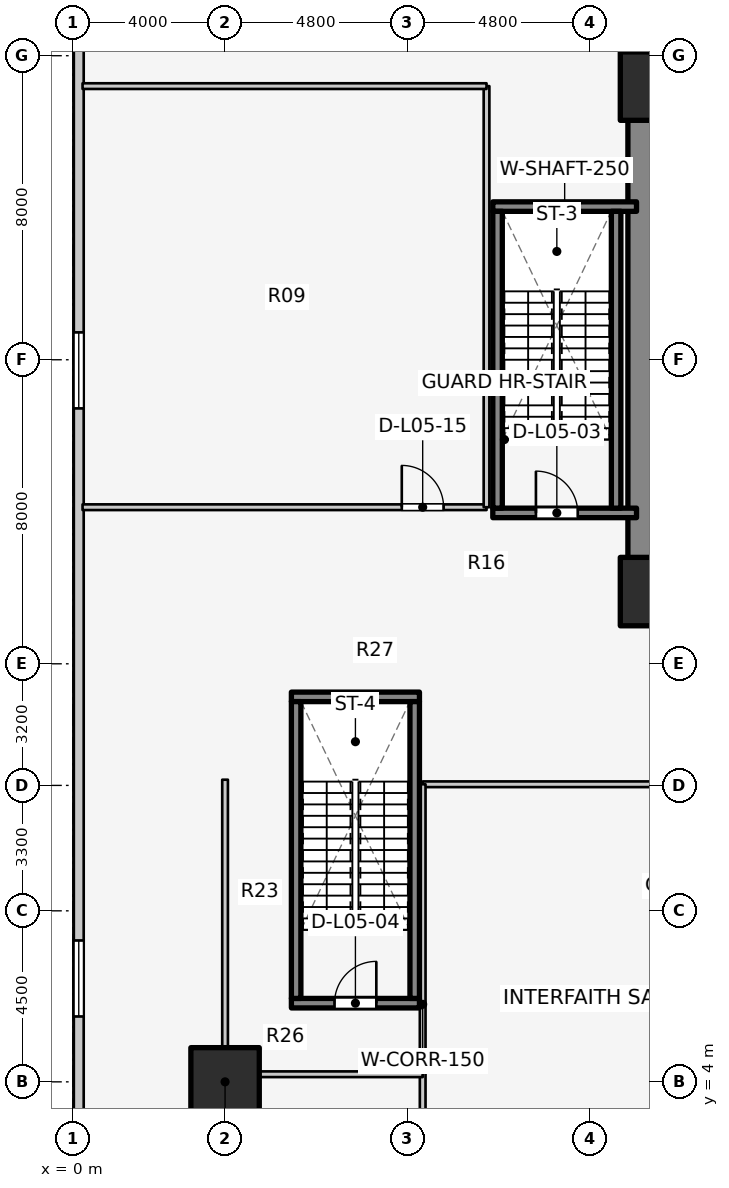
"""IFC4 building model, lengths in metres.
Left out: names, types, materials, properties, quantities, classifications, styles, units other than length and angle.
Written with IfcOpenShell. Run it as: python <this file> out.ifc"""

import sys

from ifc_helpers import new_model, si_unit, direction, frame, frame_2d, origin, origin_2d, place, context, subcontext, project, spatial, rectangle, extrude, element, fill, save


model = new_model("IFC4")
c1 = context("Model", 3, precision=1e-05, world=origin(), true_north=direction((0.0, 1.0)))
c2 = subcontext(c1, "Body", "Model", "MODEL_VIEW")
j1 = project(units=[si_unit("LENGTHUNIT", "METRE"), si_unit("PLANEANGLEUNIT", "RADIAN")], contexts=[c1])
p1 = place(None, origin())
s1 = spatial("IfcSite", under=j1, at=p1, CompositionType="ELEMENT")
p2 = place(p1, origin())
s2 = spatial("IfcBuilding", under=s1, at=p2, CompositionType="ELEMENT")
p3 = place(p2, frame((0.0, 0.0, 18.4)))
s3 = spatial("IfcBuildingStorey", under=s2, at=p3, CompositionType="ELEMENT", Elevation=18.4)
p4 = place(p3, frame((15.05, 17.05, 0.0), z_axis=(0.0, 0.0, 1.0), x_axis=(0.0, 1.0, 0.0)))
e1 = element("IfcWall", 1, at=p4, inside=s3, PredefinedType="SHEAR", context=c2, shape_type="SweptSolid", body=[
    extrude(rectangle(XDim=12.8, YDim=0.9, at=frame_2d((6.4, 0.0))), origin(), (0.0, 0.0, 1.0), 4.6),
])
p5 = place(p3, frame((11.045, 18.97, 0.0), z_axis=(0.0, 0.0, 1.0), x_axis=(1.0, 0.0, 0.0)))
e2 = element("IfcWall", 2, at=p5, inside=s3, PredefinedType="SOLIDWALL", context=c2, shape_type="SweptSolid", body=[
    extrude(rectangle(XDim=3.782, YDim=0.25, at=frame_2d((1.891, 0.0))), origin(), (0.0, 0.0, 1.0), 4.6),
])
p6 = place(p5, frame((1.135, 0.0, 0.0)))
e3 = element("IfcOpeningElement", 3, at=p6, cuts=e2, PredefinedType="OPENING", context=c2, shape_type="SweptSolid", body=[
    extrude(rectangle(XDim=1.1, YDim=2.1, at=frame_2d((0.55, 1.05))), frame((0.0, 0.135, 0.0), z_axis=(0.0, -1.0, 0.0), x_axis=(1.0, 0.0, 0.0)), (0.0, 0.0, 1.0), 0.27),
])
p7 = place(p3, frame((11.045, 27.03, 0.0), z_axis=(0.0, 0.0, 1.0), x_axis=(1.0, 0.0, 0.0)))
e4 = element("IfcWall", 4, at=p7, inside=s3, PredefinedType="SOLIDWALL", context=c2, shape_type="SweptSolid", body=[
    extrude(rectangle(XDim=3.782, YDim=0.25, at=frame_2d((1.891, 0.0))), origin(), (0.0, 0.0, 1.0), 4.6),
])
for number, where, z_axis, x_axis in (
    (5, (11.17, 19.095, 0.0), (0.0, 0.0, 1.0), (0.0, 1.0, 0.0)),
    (6, (14.29, 19.095, 0.0), (0.0, 0.0, 1.0), (0.0, 1.0, 0.0)),
):
    element("IfcWall", number, at=place(p3, frame(where, z_axis=z_axis, x_axis=x_axis)), inside=s3, PredefinedType="SOLIDWALL", context=c2, shape_type="SweptSolid", body=[
        extrude(rectangle(XDim=7.81, YDim=0.25, at=frame_2d((3.905, 0.0))), origin(), (0.0, 0.0, 1.0), 4.6),
    ])
p8 = place(p3, frame((5.745, 6.07, 0.0), z_axis=(0.0, 0.0, 1.0), x_axis=(1.0, 0.0, 0.0)))
e7 = element("IfcWall", 7, at=p8, inside=s3, PredefinedType="SOLIDWALL", context=c2, shape_type="SweptSolid", body=[
    extrude(rectangle(XDim=3.37, YDim=0.25, at=frame_2d((1.685, 0.0))), origin(), (0.0, 0.0, 1.0), 4.6),
])
p9 = place(p8, frame((1.135, 0.0, 0.0)))
e8 = element("IfcOpeningElement", 8, at=p9, cuts=e7, PredefinedType="OPENING", context=c2, shape_type="SweptSolid", body=[
    extrude(rectangle(XDim=1.1, YDim=2.1, at=frame_2d((0.55, 1.05))), frame((0.0, 0.135, 0.0), z_axis=(0.0, -1.0, 0.0), x_axis=(1.0, 0.0, 0.0)), (0.0, 0.0, 1.0), 0.27),
])
p10 = place(p3, frame((5.745, 14.13, 0.0), z_axis=(0.0, 0.0, 1.0), x_axis=(1.0, 0.0, 0.0)))
e9 = element("IfcWall", 9, at=p10, inside=s3, PredefinedType="SOLIDWALL", context=c2, shape_type="SweptSolid", body=[
    extrude(rectangle(XDim=3.37, YDim=0.25, at=frame_2d((1.685, 0.0))), origin(), (0.0, 0.0, 1.0), 4.6),
])
for number, where, z_axis, x_axis in (
    (10, (5.87, 6.195, 0.0), (0.0, 0.0, 1.0), (0.0, 1.0, 0.0)),
    (11, (8.99, 6.195, 0.0), (0.0, 0.0, 1.0), (0.0, 1.0, 0.0)),
):
    element("IfcWall", number, at=place(p3, frame(where, z_axis=z_axis, x_axis=x_axis)), inside=s3, PredefinedType="SOLIDWALL", context=c2, shape_type="SweptSolid", body=[
        extrude(rectangle(XDim=7.81, YDim=0.25, at=frame_2d((3.905, 0.0))), origin(), (0.0, 0.0, 1.0), 4.6),
    ])
for number, where, z_axis, x_axis in (
    (12, (15.3, 16.9, 0.0), (0.0, 0.0, 1.0), (1.0, 0.0, 0.0)),
    (13, (15.3, 30.2, 0.0), (0.0, 0.0, 1.0), (1.0, 0.0, 0.0)),
    (14, (4.0, 4.0, 0.0), (0.0, 0.0, 1.0), (1.0, 0.0, 0.0)),
):
    element("IfcColumn", number, at=place(p3, frame(where, z_axis=z_axis, x_axis=x_axis)), inside=s3, PredefinedType="COLUMN", context=c2, shape_type="SweptSolid", body=[
        extrude(rectangle(XDim=1.8, YDim=1.8, at=origin_2d()), origin(), (0.0, 0.0, 1.0), 4.6),
    ])
p11 = place(p3, frame((0.15, 45.72, 0.0), z_axis=(0.0, 0.0, 1.0), x_axis=(0.0, -1.0, 0.0)))
e15 = element("IfcWall", 15, at=p11, inside=s3, PredefinedType="STANDARD", context=c2, shape_type="SweptSolid", body=[
    extrude(rectangle(XDim=45.44, YDim=0.26, at=frame_2d((22.72, 0.0))), origin(), (0.0, 0.0, 1.0), 4.28),
])
p12 = place(p11, frame((6.0, 0.0, 2.2)))
e16 = element("IfcOpeningElement", 16, at=p12, cuts=e15, PredefinedType="OPENING", context=c2, shape_type="SweptSolid", body=[
    extrude(rectangle(XDim=2.0, YDim=1.1, at=frame_2d((1.0, 0.55))), frame((0.0, 0.14, 0.0), z_axis=(0.0, -1.0, 0.0), x_axis=(1.0, 0.0, 0.0)), (0.0, 0.0, 1.0), 0.28),
])
p13 = place(p11, frame((22.0, 0.0, 2.2)))
e17 = element("IfcOpeningElement", 17, at=p13, cuts=e15, PredefinedType="OPENING", context=c2, shape_type="SweptSolid", body=[
    extrude(rectangle(XDim=2.0, YDim=1.1, at=frame_2d((1.0, 0.55))), frame((0.0, 0.14, 0.0), z_axis=(0.0, -1.0, 0.0), x_axis=(1.0, 0.0, 0.0)), (0.0, 0.0, 1.0), 0.28),
])
p14 = place(p11, frame((38.0, 0.0, 2.2)))
e18 = element("IfcOpeningElement", 18, at=p14, cuts=e15, PredefinedType="OPENING", context=c2, shape_type="SweptSolid", body=[
    extrude(rectangle(XDim=2.0, YDim=1.1, at=frame_2d((1.0, 0.55))), frame((0.0, 0.14, 0.0), z_axis=(0.0, -1.0, 0.0), x_axis=(1.0, 0.0, 0.0)), (0.0, 0.0, 1.0), 0.28),
])
p15 = place(p3, frame((9.2, 11.83, 0.0), z_axis=(0.0, 0.0, 1.0), x_axis=(1.0, 0.0, 0.0)))
e19 = element("IfcWall", 19, at=p15, inside=s3, PredefinedType="PARTITIONING", context=c2, shape_type="SweptSolid", body=[
    extrude(rectangle(XDim=45.6, YDim=0.15, at=frame_2d((22.8, 0.0))), origin(), (0.0, 0.0, 1.0), 3.3),
])
p16 = place(p15, frame((10.8, 0.0, 0.0)))
e20 = element("IfcOpeningElement", 20, at=p16, cuts=e19, PredefinedType="OPENING", context=c2, shape_type="SweptSolid", body=[
    extrude(rectangle(XDim=1.1, YDim=2.1, at=frame_2d((0.55, 1.05))), frame((0.0, 0.085, 0.0), z_axis=(0.0, -1.0, 0.0), x_axis=(1.0, 0.0, 0.0)), (0.0, 0.0, 1.0), 0.17),
])
p17 = place(p15, frame((33.6, 0.0, 0.0)))
e21 = element("IfcOpeningElement", 21, at=p17, cuts=e19, PredefinedType="OPENING", context=c2, shape_type="SweptSolid", body=[
    extrude(rectangle(XDim=1.1, YDim=2.1, at=frame_2d((0.55, 1.05))), frame((0.0, 0.085, 0.0), z_axis=(0.0, -1.0, 0.0), x_axis=(1.0, 0.0, 0.0)), (0.0, 0.0, 1.0), 0.17),
])
p18 = place(p3, frame((9.2, 0.25, 0.0), z_axis=(0.0, 0.0, 1.0), x_axis=(0.0, 1.0, 0.0)))
e22 = element("IfcWall", 22, at=p18, inside=s3, PredefinedType="PARTITIONING", context=c2, shape_type="SweptSolid", body=[
    extrude(rectangle(XDim=11.58, YDim=0.15, at=frame_2d((5.79, 0.0))), origin(), (0.0, 0.0, 1.0), 3.3),
])
p19 = place(p3, frame((4.0, 4.2, 0.0), z_axis=(0.0, 0.0, 1.0), x_axis=(0.0, 1.0, 0.0)))
e23 = element("IfcWall", 23, at=p19, inside=s3, PredefinedType="PARTITIONING", context=c2, shape_type="SweptSolid", body=[
    extrude(rectangle(XDim=7.75, YDim=0.15, at=frame_2d((3.875, 0.0))), origin(), (0.0, 0.0, 1.0), 3.3),
])
p20 = place(p3, frame((4.0, 4.2, 0.0), z_axis=(0.0, 0.0, 1.0), x_axis=(1.0, 0.0, 0.0)))
e24 = element("IfcWall", 24, at=p20, inside=s3, PredefinedType="PARTITIONING", context=c2, shape_type="SweptSolid", body=[
    extrude(rectangle(XDim=5.2, YDim=0.15, at=frame_2d((2.6, 0.0))), origin(), (0.0, 0.0, 1.0), 3.3),
])
p21 = place(p3, frame((0.25, 19.12, 0.0), z_axis=(0.0, 0.0, 1.0), x_axis=(1.0, 0.0, 0.0)))
e25 = element("IfcWall", 25, at=p21, inside=s3, PredefinedType="PARTITIONING", context=c2, shape_type="SweptSolid", body=[
    extrude(rectangle(XDim=10.63, YDim=0.15, at=frame_2d((5.315, 0.0))), origin(), (0.0, 0.0, 1.0), 3.3),
])
p22 = place(p21, frame((8.4, 0.0, 0.0)))
e26 = element("IfcOpeningElement", 26, at=p22, cuts=e25, PredefinedType="OPENING", context=c2, shape_type="SweptSolid", body=[
    extrude(rectangle(XDim=1.1, YDim=2.1, at=frame_2d((0.55, 1.05))), frame((0.0, 0.085, 0.0), z_axis=(0.0, -1.0, 0.0), x_axis=(1.0, 0.0, 0.0)), (0.0, 0.0, 1.0), 0.17),
])
p23 = place(p3, frame((10.88, 19.12, 0.0), z_axis=(0.0, 0.0, 1.0), x_axis=(0.0, 1.0, 0.0)))
e27 = element("IfcWall", 27, at=p23, inside=s3, PredefinedType="PARTITIONING", context=c2, shape_type="SweptSolid", body=[
    extrude(rectangle(XDim=11.08, YDim=0.15, at=frame_2d((5.54, 0.0))), origin(), (0.0, 0.0, 1.0), 3.62),
])
p24 = place(p3, frame((0.25, 30.2, 0.0), z_axis=(0.0, 0.0, 1.0), x_axis=(1.0, 0.0, 0.0)))
e28 = element("IfcWall", 28, at=p24, inside=s3, PredefinedType="PARTITIONING", context=c2, shape_type="SweptSolid", body=[
    extrude(rectangle(XDim=10.63, YDim=0.15, at=frame_2d((5.315, 0.0))), origin(), (0.0, 0.0, 1.0), 3.3),
])
p25 = place(p13, origin())
e29 = element("IfcWindow", 29, at=p25, inside=s3, PartitioningType="SINGLE_PANEL", PredefinedType="WINDOW", context=c2, shape_type="SweptSolid", body=[
    extrude(rectangle(XDim=2.0, YDim=1.1, at=frame_2d((1.0, 0.55))), frame((0.0, 0.03, 0.0), z_axis=(0.0, -1.0, 0.0), x_axis=(1.0, 0.0, 0.0)), (0.0, 0.0, 1.0), 0.06),
])
fill(e17, e29)
p26 = place(p14, origin())
e30 = element("IfcWindow", 30, at=p26, inside=s3, PartitioningType="SINGLE_PANEL", PredefinedType="WINDOW", context=c2, shape_type="SweptSolid", body=[
    extrude(rectangle(XDim=2.0, YDim=1.1, at=frame_2d((1.0, 0.55))), frame((0.0, 0.03, 0.0), z_axis=(0.0, -1.0, 0.0), x_axis=(1.0, 0.0, 0.0)), (0.0, 0.0, 1.0), 0.06),
])
fill(e18, e30)
p27 = place(p6, origin())
e31 = element("IfcDoor", 31, at=p27, inside=s3, OperationType="SINGLE_SWING_LEFT", PredefinedType="DOOR", context=c2, shape_type="SweptSolid", body=[
    extrude(rectangle(XDim=1.1, YDim=2.1, at=frame_2d((0.55, 1.05))), frame((0.0, 0.025, 0.0), z_axis=(0.0, -1.0, 0.0), x_axis=(1.0, 0.0, 0.0)), (0.0, 0.0, 1.0), 0.05),
])
fill(e3, e31)
p28 = place(p9, origin())
e32 = element("IfcDoor", 32, at=p28, inside=s3, OperationType="SINGLE_SWING_RIGHT", PredefinedType="DOOR", context=c2, shape_type="SweptSolid", body=[
    extrude(rectangle(XDim=1.1, YDim=2.1, at=frame_2d((0.55, 1.05))), frame((0.0, 0.025, 0.0), z_axis=(0.0, -1.0, 0.0), x_axis=(1.0, 0.0, 0.0)), (0.0, 0.0, 1.0), 0.05),
])
fill(e8, e32)
p29 = place(p22, origin())
e33 = element("IfcDoor", 33, at=p29, inside=s3, OperationType="SINGLE_SWING_LEFT", PredefinedType="DOOR", context=c2, shape_type="SweptSolid", body=[
    extrude(rectangle(XDim=1.1, YDim=2.1, at=frame_2d((0.55, 1.05))), frame((0.0, 0.025, 0.0), z_axis=(0.0, -1.0, 0.0), x_axis=(1.0, 0.0, 0.0)), (0.0, 0.0, 1.0), 0.05),
])
fill(e26, e33)
save(model, sys.argv[1])
